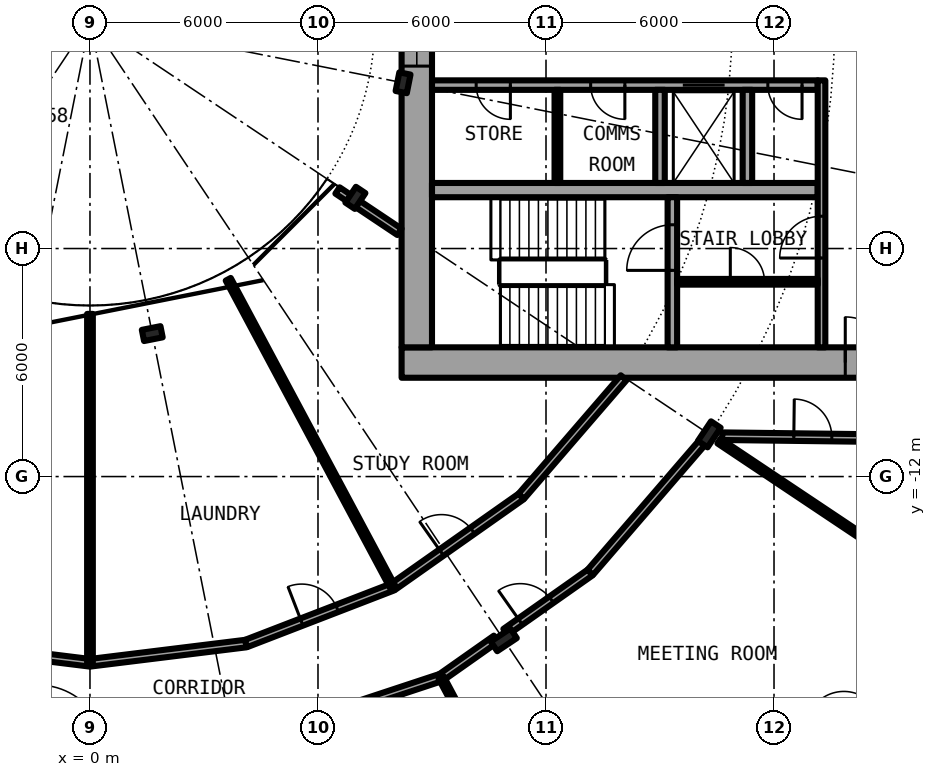
"""IFC4 building model, lengths in metres.
Left out: names, types, materials, properties, quantities, classifications, styles, units other than length and angle.
Written with IfcOpenShell. Run it as: python <this file> out.ifc"""

import sys

from ifc_helpers import new_model, si_unit, direction, frame, frame_2d, origin, origin_2d, place, context, subcontext, project, spatial, rectangle, i_section, extrude, element, fill, save


model = new_model("IFC4")
c1 = context("Model", 3, precision=1e-05, world=origin(), true_north=direction((0.0, 1.0)))
c2 = subcontext(c1, "Body", "Model", "MODEL_VIEW")
j1 = project(units=[si_unit("LENGTHUNIT", "METRE"), si_unit("PLANEANGLEUNIT", "RADIAN")], contexts=[c1])
p1 = place(None, origin())
s1 = spatial("IfcSite", under=j1, at=p1, CompositionType="ELEMENT")
p2 = place(p1, origin())
s2 = spatial("IfcBuilding", under=s1, at=p2, CompositionType="ELEMENT")
p3 = place(p2, frame((0.0, 0.0, 53.3)))
s3 = spatial("IfcBuildingStorey", under=s2, at=p3, CompositionType="ELEMENT", Elevation=53.3)
for number, where, z_axis, x_axis in (
    (1, (10.889, -16.297, 0.0), (0.0, 0.0, 1.0), (0.556, -0.831, 0.0)),
    (2, (16.297, -10.889, 0.0), (0.0, 0.0, 1.0), (0.831, -0.556, 0.0)),
):
    element("IfcColumn", number, at=place(p3, frame(where, z_axis=z_axis, x_axis=x_axis)), inside=s3, PredefinedType="COLUMN", context=c2, shape_type="SweptSolid", body=[
        extrude(i_section(OverallWidth=0.305, OverallDepth=0.62, WebThickness=0.021, FlangeThickness=0.04, FilletRadius=0.027, at=origin_2d()), origin(), (0.0, 0.0, 1.0), 4.2),
    ])
for number, where, z_axis, x_axis in (
    (3, (1.639, -8.239, 0.0), (0.0, 0.0, 1.0), (0.195, -0.981, 0.0)),
    (4, (6.984, -4.667, 0.0), (0.0, 0.0, 1.0), (0.831, -0.556, 0.0)),
    (5, (8.239, -1.639, 0.0), (0.0, 0.0, 1.0), (0.981, -0.195, 0.0)),
):
    element("IfcColumn", number, at=place(p3, frame(where, z_axis=z_axis, x_axis=x_axis)), inside=s3, PredefinedType="COLUMN", context=c2, shape_type="SweptSolid", body=[
        extrude(i_section(OverallWidth=0.3, OverallDepth=0.5, WebThickness=0.014, FlangeThickness=0.028, FilletRadius=0.027, at=origin_2d()), origin(), (0.0, 0.0, 1.0), 4.2),
    ])
p4 = place(p3, frame((19.304, -19.304, 0.0), z_axis=(0.0, 0.0, 1.0), x_axis=(0.634382322723, 0.773019449054, 0.0)))
e6 = element("IfcWall", 6, at=p4, inside=s3, PredefinedType="SOLIDWALL", context=c2, shape_type="SweptSolid", body=[
    extrude(rectangle(XDim=5.352, YDim=0.25, at=frame_2d((2.676, 0.0))), origin(), (0.0, 0.0, 1.0), 3.8),
])
p5 = place(p4, frame((0.841, 0.0, 0.0)))
e7 = element("IfcOpeningElement", 7, at=p5, cuts=e6, PredefinedType="OPENING", context=c2, shape_type="SweptSolid", body=[
    extrude(rectangle(XDim=1.0, YDim=2.2, at=frame_2d((0.5, 1.1))), frame((0.0, 0.135, 0.0), z_axis=(0.0, -1.0, 0.0), x_axis=(1.0, 0.0, 0.0)), (0.0, 0.0, 1.0), 0.27),
])
p6 = place(p4, frame((3.51, 0.0, 0.0)))
e8 = element("IfcOpeningElement", 8, at=p6, cuts=e6, PredefinedType="OPENING", context=c2, shape_type="SweptSolid", body=[
    extrude(rectangle(XDim=1.0, YDim=2.2, at=frame_2d((0.5, 1.1))), frame((0.0, 0.135, 0.0), z_axis=(0.0, -1.0, 0.0), x_axis=(1.0, 0.0, 0.0)), (0.0, 0.0, 1.0), 0.27),
])
p7 = place(p3, frame((8.2, -9.0, 0.0), z_axis=(0.0, 0.0, 1.0), x_axis=(1.0, 0.0, 0.0)))
e9 = element("IfcWall", 9, at=p7, inside=s3, PredefinedType="SHEAR", context=c2, shape_type="SweptSolid", body=[
    extrude(rectangle(XDim=14.2, YDim=0.8, at=frame_2d((7.1, 0.0))), origin(), (0.0, 0.0, 1.0), 4.2),
])
p8 = place(p7, frame((11.675, 0.0, 0.0)))
e10 = element("IfcOpeningElement", 10, at=p8, cuts=e9, PredefinedType="OPENING", context=c2, shape_type="SweptSolid", body=[
    extrude(rectangle(XDim=1.2, YDim=2.3, at=frame_2d((0.6, 1.15))), frame((0.0, 0.41, 0.0), z_axis=(0.0, -1.0, 0.0), x_axis=(1.0, 0.0, 0.0)), (0.0, 0.0, 1.0), 0.82),
])
p9 = place(p3, frame((8.6, -8.6, 0.0), z_axis=(0.0, 0.0, 1.0), x_axis=(0.0, 1.0, 0.0)))
e11 = element("IfcWall", 11, at=p9, inside=s3, PredefinedType="SHEAR", context=c2, shape_type="SweptSolid", body=[
    extrude(rectangle(XDim=17.2, YDim=0.8, at=frame_2d((8.6, 0.0))), origin(), (0.0, 0.0, 1.0), 4.2),
])
p10 = place(p9, frame((7.4, 0.0, 0.1)))
e12 = element("IfcOpeningElement", 12, at=p10, cuts=e11, PredefinedType="OPENING", context=c2, shape_type="SweptSolid", body=[
    extrude(rectangle(XDim=2.4, YDim=2.2, at=frame_2d((1.2, 1.1))), frame((0.0, 0.41, 0.0), z_axis=(0.0, -1.0, 0.0), x_axis=(1.0, 0.0, 0.0)), (0.0, 0.0, 1.0), 0.82),
])
p11 = place(p3, frame((19.15, -1.7, 0.0), z_axis=(0.0, 0.0, 1.0), x_axis=(-1.0, 0.0, 0.0)))
e13 = element("IfcWall", 13, at=p11, inside=s3, PredefinedType="SHEAR", context=c2, shape_type="SweptSolid", body=[
    extrude(rectangle(XDim=10.15, YDim=0.25, at=frame_2d((5.075, 0.0))), origin(), (0.0, 0.0, 1.0), 4.2),
])
p12 = place(p11, frame((2.45, 0.0, 0.0)))
e14 = element("IfcOpeningElement", 14, at=p12, cuts=e13, PredefinedType="OPENING", context=c2, shape_type="SweptSolid", body=[
    extrude(rectangle(XDim=1.1, YDim=2.3, at=frame_2d((0.55, 1.15))), frame((0.0, 0.135, 0.0), z_axis=(0.0, -1.0, 0.0), x_axis=(1.0, 0.0, 0.0)), (0.0, 0.0, 1.0), 0.27),
])
p13 = place(p11, frame((8.087, 0.0, 0.0)))
e15 = element("IfcOpeningElement", 15, at=p13, cuts=e13, PredefinedType="OPENING", context=c2, shape_type="SweptSolid", body=[
    extrude(rectangle(XDim=0.9, YDim=2.3, at=frame_2d((0.45, 1.15))), frame((0.0, 0.135, 0.0), z_axis=(0.0, -1.0, 0.0), x_axis=(1.0, 0.0, 0.0)), (0.0, 0.0, 1.0), 0.27),
])
p14 = place(p11, frame((5.075, 0.0, 0.0)))
e16 = element("IfcOpeningElement", 16, at=p14, cuts=e13, PredefinedType="OPENING", context=c2, shape_type="SweptSolid", body=[
    extrude(rectangle(XDim=0.9, YDim=2.3, at=frame_2d((0.45, 1.15))), frame((0.0, 0.135, 0.0), z_axis=(0.0, -1.0, 0.0), x_axis=(1.0, 0.0, 0.0)), (0.0, 0.0, 1.0), 0.27),
])
p15 = place(p11, frame((0.413, 0.0, 0.0)))
e17 = element("IfcOpeningElement", 17, at=p15, cuts=e13, PredefinedType="OPENING", context=c2, shape_type="SweptSolid", body=[
    extrude(rectangle(XDim=0.9, YDim=2.3, at=frame_2d((0.45, 1.15))), frame((0.0, 0.135, 0.0), z_axis=(0.0, -1.0, 0.0), x_axis=(1.0, 0.0, 0.0)), (0.0, 0.0, 1.0), 0.27),
])
p16 = place(p3, frame((9.0, -4.462, 0.0), z_axis=(0.0, 0.0, 1.0), x_axis=(1.0, 0.0, 0.0)))
e18 = element("IfcWall", 18, at=p16, inside=s3, PredefinedType="SHEAR", context=c2, shape_type="SweptSolid", body=[
    extrude(rectangle(XDim=10.15, YDim=0.375, at=frame_2d((5.075, 0.0))), origin(), (0.0, 0.0, 1.0), 4.2),
])
p17 = place(p3, frame((15.325, -8.6, 0.0), z_axis=(0.0, 0.0, 1.0), x_axis=(0.0, 1.0, 0.0)))
e19 = element("IfcWall", 19, at=p17, inside=s3, PredefinedType="SHEAR", context=c2, shape_type="SweptSolid", body=[
    extrude(rectangle(XDim=3.95, YDim=0.25, at=frame_2d((1.975, 0.0))), origin(), (0.0, 0.0, 1.0), 4.2),
])
p18 = place(p17, frame((2.025, 0.0, 0.0)))
e20 = element("IfcOpeningElement", 20, at=p18, cuts=e19, PredefinedType="OPENING", context=c2, shape_type="SweptSolid", body=[
    extrude(rectangle(XDim=1.2, YDim=2.3, at=frame_2d((0.6, 1.15))), frame((0.0, 0.135, 0.0), z_axis=(0.0, -1.0, 0.0), x_axis=(1.0, 0.0, 0.0)), (0.0, 0.0, 1.0), 0.27),
])
for number, where, z_axis, x_axis in (
    (21, (15.0, -1.825, 0.0), (0.0, 0.0, 1.0), (0.0, -1.0, 0.0)),
    (22, (17.3, -1.825, 0.0), (0.0, 0.0, 1.0), (0.0, -1.0, 0.0)),
):
    element("IfcWall", number, at=place(p3, frame(where, z_axis=z_axis, x_axis=x_axis)), inside=s3, PredefinedType="SOLIDWALL", context=c2, shape_type="SweptSolid", body=[
        extrude(rectangle(XDim=2.45, YDim=0.25, at=frame_2d((1.225, 0.0))), origin(), (0.0, 0.0, 1.0), 3.8),
    ])
p19 = place(p3, frame((19.25, -8.6, 0.0), z_axis=(0.0, 0.0, 1.0), x_axis=(0.0, 1.0, 0.0)))
e23 = element("IfcWall", 23, at=p19, inside=s3, PredefinedType="SOLIDWALL", context=c2, shape_type="SweptSolid", body=[
    extrude(rectangle(XDim=7.025, YDim=0.2, at=frame_2d((3.513, 0.0))), origin(), (0.0, 0.0, 1.0), 3.8),
])
p20 = place(p19, frame((2.35, 0.0, 0.0)))
e24 = element("IfcOpeningElement", 24, at=p20, cuts=e23, PredefinedType="OPENING", context=c2, shape_type="SweptSolid", body=[
    extrude(rectangle(XDim=1.1, YDim=2.3, at=frame_2d((0.55, 1.15))), frame((0.0, 0.11, 0.0), z_axis=(0.0, -1.0, 0.0), x_axis=(1.0, 0.0, 0.0)), (0.0, 0.0, 1.0), 0.22),
])
p21 = place(p3, frame((12.3, -1.825, 0.0), z_axis=(0.0, 0.0, 1.0), x_axis=(0.0, -1.0, 0.0)))
e25 = element("IfcWall", 25, at=p21, inside=s3, PredefinedType="PARTITIONING", context=c2, shape_type="SweptSolid", body=[
    extrude(rectangle(XDim=2.45, YDim=0.15, at=frame_2d((1.225, 0.0))), origin(), (0.0, 0.0, 1.0), 3.8),
])
p22 = place(p3, frame((15.45, -6.875, 0.0), z_axis=(0.0, 0.0, 1.0), x_axis=(1.0, 0.0, 0.0)))
e26 = element("IfcWall", 26, at=p22, inside=s3, PredefinedType="PARTITIONING", context=c2, shape_type="SweptSolid", body=[
    extrude(rectangle(XDim=3.7, YDim=0.15, at=frame_2d((1.85, 0.0))), origin(), (0.0, 0.0, 1.0), 3.8),
])
p23 = place(p22, frame((1.4, 0.0, 0.0)))
e27 = element("IfcOpeningElement", 27, at=p23, cuts=e26, PredefinedType="OPENING", context=c2, shape_type="SweptSolid", body=[
    extrude(rectangle(XDim=0.9, YDim=2.3, at=frame_2d((0.45, 1.15))), frame((0.0, 0.085, 0.0), z_axis=(0.0, -1.0, 0.0), x_axis=(1.0, 0.0, 0.0)), (0.0, 0.0, 1.0), 0.17),
])
p24 = place(p3, frame((9.239, -17.286, 0.0), z_axis=(0.0, 0.0, 1.0), x_axis=(0.81766692021, 0.575691590693, 0.0)))
e28 = element("IfcWall", 28, at=p24, inside=s3, PredefinedType="PARTITIONING", context=c2, shape_type="SweptSolid", body=[
    extrude(rectangle(XDim=1.77, YDim=0.2, at=frame_2d((0.885, 0.0))), origin(), (0.0, 0.0, 1.0), 3.48),
])
p25 = place(p3, frame((10.935, -16.091, 0.0), z_axis=(0.0, 0.0, 1.0), x_axis=(0.817764243714, 0.575553335237, 0.0)))
e29 = element("IfcWall", 29, at=p25, inside=s3, PredefinedType="PARTITIONING", context=c2, shape_type="SweptSolid", body=[
    extrude(rectangle(XDim=2.725, YDim=0.2, at=frame_2d((1.362, 0.0))), origin(), (0.0, 0.0, 1.0), 3.48),
])
p26 = place(p25, frame((0.475, 0.0, 0.0)))
e30 = element("IfcOpeningElement", 30, at=p26, cuts=e29, PredefinedType="OPENING", context=c2, shape_type="SweptSolid", body=[
    extrude(rectangle(XDim=1.0, YDim=2.3, at=frame_2d((0.5, 1.15))), frame((0.0, 0.11, 0.0), z_axis=(0.0, -1.0, 0.0), x_axis=(1.0, 0.0, 0.0)), (0.0, 0.0, 1.0), 0.22),
])
p27 = place(p3, frame((13.163, -14.523, 0.0), z_axis=(0.0, 0.0, 1.0), x_axis=(0.653087281304, 0.757282644063, 0.0)))
e31 = element("IfcWall", 31, at=p27, inside=s3, PredefinedType="PARTITIONING", context=c2, shape_type="SweptSolid", body=[
    extrude(rectangle(XDim=4.644, YDim=0.2, at=frame_2d((2.322, 0.0))), origin(), (0.0, 0.0, 1.0), 3.48),
])
p28 = place(p3, frame((3.942, -19.036, 0.0), z_axis=(0.0, 0.0, 1.0), x_axis=(0.949524538902, 0.313692763739, 0.0)))
e32 = element("IfcWall", 32, at=p28, inside=s3, PredefinedType="PARTITIONING", context=c2, shape_type="SweptSolid", body=[
    extrude(rectangle(XDim=5.579, YDim=0.2, at=frame_2d((2.789, 0.0))), origin(), (0.0, 0.0, 1.0), 3.48),
])
for number, where, z_axis, x_axis in (
    (33, (-4.106, -16.394, 0.0), (0.0, 0.0, 1.0), (0.992, -0.122, 0.0)),
    (34, (0.0, -16.9, 0.0), (0.0, 0.0, 1.0), (0.992, 0.122, 0.0)),
):
    element("IfcWall", number, at=place(p3, frame(where, z_axis=z_axis, x_axis=x_axis)), inside=s3, PredefinedType="PARTITIONING", context=c2, shape_type="SweptSolid", body=[
        extrude(rectangle(XDim=4.137, YDim=0.2, at=frame_2d((2.068, 0.0))), origin(), (0.0, 0.0, 1.0), 3.8),
    ])
p29 = place(p3, frame((4.106, -16.394, 0.0), z_axis=(0.0, 0.0, 1.0), x_axis=(0.932943640288, 0.360022449363, 0.0)))
e35 = element("IfcWall", 35, at=p29, inside=s3, PredefinedType="PARTITIONING", context=c2, shape_type="SweptSolid", body=[
    extrude(rectangle(XDim=4.139, YDim=0.2, at=frame_2d((2.069, 0.0))), origin(), (0.0, 0.0, 1.0), 3.8),
])
p30 = place(p29, frame((1.569, 0.0, 0.0)))
e36 = element("IfcOpeningElement", 36, at=p30, cuts=e35, PredefinedType="OPENING", context=c2, shape_type="SweptSolid", body=[
    extrude(rectangle(XDim=1.0, YDim=2.3, at=frame_2d((0.5, 1.15))), frame((0.0, 0.11, 0.0), z_axis=(0.0, -1.0, 0.0), x_axis=(1.0, 0.0, 0.0)), (0.0, 0.0, 1.0), 0.22),
])
p31 = place(p3, frame((7.967, -14.904, 0.0), z_axis=(0.0, 0.0, 1.0), x_axis=(0.817567680547, 0.575832517079, 0.0)))
e37 = element("IfcWall", 37, at=p31, inside=s3, PredefinedType="PARTITIONING", context=c2, shape_type="SweptSolid", body=[
    extrude(rectangle(XDim=4.137, YDim=0.2, at=frame_2d((2.068, 0.0))), origin(), (0.0, 0.0, 1.0), 3.8),
])
p32 = place(p31, frame((1.568, 0.0, 0.0)))
e38 = element("IfcOpeningElement", 38, at=p32, cuts=e37, PredefinedType="OPENING", context=c2, shape_type="SweptSolid", body=[
    extrude(rectangle(XDim=1.0, YDim=2.3, at=frame_2d((0.5, 1.15))), frame((0.0, 0.11, 0.0), z_axis=(0.0, -1.0, 0.0), x_axis=(1.0, 0.0, 0.0)), (0.0, 0.0, 1.0), 0.22),
])
p33 = place(p3, frame((11.349, -12.522, 0.0), z_axis=(0.0, 0.0, 1.0), x_axis=(0.653274518104, 0.757121129012, 0.0)))
e39 = element("IfcWall", 39, at=p33, inside=s3, PredefinedType="PARTITIONING", context=c2, shape_type="SweptSolid", body=[
    extrude(rectangle(XDim=4.124, YDim=0.2, at=frame_2d((2.062, 0.0))), origin(), (0.0, 0.0, 1.0), 3.8),
])
p34 = place(p3, frame((16.637, -10.938, 0.0), z_axis=(0.0, 0.0, 1.0), x_axis=(0.99992425795, -0.012307654658, 0.0)))
e40 = element("IfcWall", 40, at=p34, inside=s3, PredefinedType="PARTITIONING", context=c2, shape_type="SweptSolid", body=[
    extrude(rectangle(XDim=5.039, YDim=0.2, at=frame_2d((2.519, 0.0))), origin(), (0.0, 0.0, 1.0), 3.8),
])
p35 = place(p34, frame((1.884, 0.0, 0.0)))
e41 = element("IfcOpeningElement", 41, at=p35, cuts=e40, PredefinedType="OPENING", context=c2, shape_type="SweptSolid", body=[
    extrude(rectangle(XDim=1.0, YDim=2.3, at=frame_2d((0.5, 1.15))), frame((0.0, 0.11, 0.0), z_axis=(0.0, -1.0, 0.0), x_axis=(1.0, 0.0, 0.0)), (0.0, 0.0, 1.0), 0.22),
])
p36 = place(p3, frame((6.513, -4.472, 0.0), z_axis=(0.0, 0.0, 1.0), x_axis=(0.831417956244, -0.555647533996, 0.0)))
e42 = element("IfcWall", 42, at=p36, inside=s3, PredefinedType="PARTITIONING", context=c2, shape_type="SweptSolid", body=[
    extrude(rectangle(XDim=1.962, YDim=0.2, at=frame_2d((0.981, 0.0))), origin(), (0.0, 0.0, 1.0), 3.8),
])
p37 = place(p3, frame((0.0, -16.9, 0.0), z_axis=(0.0, 0.0, 1.0), x_axis=(0.0, 1.0, 0.0)))
e43 = element("IfcWall", 43, at=p37, inside=s3, PredefinedType="PARTITIONING", context=c2, shape_type="SweptSolid", body=[
    extrude(rectangle(XDim=9.18, YDim=0.15, at=frame_2d((4.59, 0.0))), origin(), (0.0, 0.0, 1.0), 3.8),
])
p38 = place(p3, frame((3.638, -6.809, 0.0), z_axis=(0.0, 0.0, 1.0), x_axis=(0.471460365694, -0.881887251059, 0.0)))
e44 = element("IfcWall", 44, at=p38, inside=s3, PredefinedType="PARTITIONING", context=c2, shape_type="SweptSolid", body=[
    extrude(rectangle(XDim=9.18, YDim=0.15, at=frame_2d((4.59, 0.0))), origin(), (0.0, 0.0, 1.0), 3.8),
])
p39 = place(p3, frame((9.239, -17.286, 0.0), z_axis=(0.0, 0.0, 1.0), x_axis=(0.471439510802, -0.881898399848, 0.0)))
e45 = element("IfcWall", 45, at=p39, inside=s3, PredefinedType="PARTITIONING", context=c2, shape_type="SweptSolid", body=[
    extrude(rectangle(XDim=7.575, YDim=0.15, at=frame_2d((3.787, 0.0))), origin(), (0.0, 0.0, 1.0), 3.8),
])
p40 = place(p3, frame((16.552, -11.065, 0.0), z_axis=(0.0, 0.0, 1.0), x_axis=(0.831491533374, -0.555537424416, 0.0)))
e46 = element("IfcWall", 46, at=p40, inside=s3, PredefinedType="PARTITIONING", context=c2, shape_type="SweptSolid", body=[
    extrude(rectangle(XDim=7.265, YDim=0.15, at=frame_2d((3.633, 0.0))), origin(), (0.0, 0.0, 1.0), 3.8),
])
p41 = place(p12, origin())
e47 = element("IfcDoor", 47, at=p41, inside=s3, OperationType="DOUBLE_DOOR_SLIDING", PredefinedType="DOOR", context=c2, shape_type="SweptSolid", body=[
    extrude(rectangle(XDim=1.1, YDim=2.3, at=frame_2d((0.55, 1.15))), frame((0.0, 0.025, 0.0), z_axis=(0.0, -1.0, 0.0), x_axis=(1.0, 0.0, 0.0)), (0.0, 0.0, 1.0), 0.05),
])
fill(e14, e47)
p42 = place(p13, origin())
e48 = element("IfcDoor", 48, at=p42, inside=s3, OperationType="SINGLE_SWING_LEFT", PredefinedType="DOOR", context=c2, shape_type="SweptSolid", body=[
    extrude(rectangle(XDim=0.9, YDim=2.3, at=frame_2d((0.45, 1.15))), frame((0.0, 0.025, 0.0), z_axis=(0.0, -1.0, 0.0), x_axis=(1.0, 0.0, 0.0)), (0.0, 0.0, 1.0), 0.05),
])
fill(e15, e48)
p43 = place(p14, origin())
e49 = element("IfcDoor", 49, at=p43, inside=s3, OperationType="SINGLE_SWING_LEFT", PredefinedType="DOOR", context=c2, shape_type="SweptSolid", body=[
    extrude(rectangle(XDim=0.9, YDim=2.3, at=frame_2d((0.45, 1.15))), frame((0.0, 0.025, 0.0), z_axis=(0.0, -1.0, 0.0), x_axis=(1.0, 0.0, 0.0)), (0.0, 0.0, 1.0), 0.05),
])
fill(e16, e49)
p44 = place(p15, origin())
e50 = element("IfcDoor", 50, at=p44, inside=s3, OperationType="SINGLE_SWING_RIGHT", PredefinedType="DOOR", context=c2, shape_type="SweptSolid", body=[
    extrude(rectangle(XDim=0.9, YDim=2.3, at=frame_2d((0.45, 1.15))), frame((0.0, 0.025, 0.0), z_axis=(0.0, -1.0, 0.0), x_axis=(1.0, 0.0, 0.0)), (0.0, 0.0, 1.0), 0.05),
])
fill(e17, e50)
p45 = place(p23, origin())
e51 = element("IfcDoor", 51, at=p45, inside=s3, OperationType="SINGLE_SWING_LEFT", PredefinedType="DOOR", context=c2, shape_type="SweptSolid", body=[
    extrude(rectangle(XDim=0.9, YDim=2.3, at=frame_2d((0.45, 1.15))), frame((0.0, 0.025, 0.0), z_axis=(0.0, -1.0, 0.0), x_axis=(1.0, 0.0, 0.0)), (0.0, 0.0, 1.0), 0.05),
])
fill(e27, e51)
p46 = place(p18, origin())
e52 = element("IfcDoor", 52, at=p46, inside=s3, OperationType="SINGLE_SWING_LEFT", PredefinedType="DOOR", context=c2, shape_type="SweptSolid", body=[
    extrude(rectangle(XDim=1.2, YDim=2.3, at=frame_2d((0.6, 1.15))), frame((0.0, 0.025, 0.0), z_axis=(0.0, -1.0, 0.0), x_axis=(1.0, 0.0, 0.0)), (0.0, 0.0, 1.0), 0.05),
])
fill(e20, e52)
p47 = place(p20, origin())
e53 = element("IfcDoor", 53, at=p47, inside=s3, OperationType="SINGLE_SWING_RIGHT", PredefinedType="DOOR", context=c2, shape_type="SweptSolid", body=[
    extrude(rectangle(XDim=1.1, YDim=2.3, at=frame_2d((0.55, 1.15))), frame((0.0, 0.025, 0.0), z_axis=(0.0, -1.0, 0.0), x_axis=(1.0, 0.0, 0.0)), (0.0, 0.0, 1.0), 0.05),
])
fill(e24, e53)
p48 = place(p8, origin())
e54 = element("IfcDoor", 54, at=p48, inside=s3, OperationType="SINGLE_SWING_LEFT", PredefinedType="DOOR", context=c2, shape_type="SweptSolid", body=[
    extrude(rectangle(XDim=1.2, YDim=2.3, at=frame_2d((0.6, 1.15))), frame((0.0, 0.025, 0.0), z_axis=(0.0, -1.0, 0.0), x_axis=(1.0, 0.0, 0.0)), (0.0, 0.0, 1.0), 0.05),
])
fill(e10, e54)
p49 = place(p10, origin())
e55 = element("IfcWindow", 55, at=p49, inside=s3, PartitioningType="SINGLE_PANEL", PredefinedType="WINDOW", context=c2, shape_type="SweptSolid", body=[
    extrude(rectangle(XDim=2.4, YDim=2.2, at=frame_2d((1.2, 1.1))), frame((0.0, 0.03, 0.0), z_axis=(0.0, -1.0, 0.0), x_axis=(1.0, 0.0, 0.0)), (0.0, 0.0, 1.0), 0.06),
])
fill(e12, e55)
p50 = place(p26, origin())
e56 = element("IfcDoor", 56, at=p50, inside=s3, OperationType="SINGLE_SWING_LEFT", PredefinedType="DOOR", context=c2, shape_type="SweptSolid", body=[
    extrude(rectangle(XDim=1.0, YDim=2.3, at=frame_2d((0.5, 1.15))), frame((0.0, 0.025, 0.0), z_axis=(0.0, -1.0, 0.0), x_axis=(1.0, 0.0, 0.0)), (0.0, 0.0, 1.0), 0.05),
])
fill(e30, e56)
p51 = place(p30, origin())
e57 = element("IfcDoor", 57, at=p51, inside=s3, OperationType="SINGLE_SWING_RIGHT", PredefinedType="DOOR", context=c2, shape_type="SweptSolid", body=[
    extrude(rectangle(XDim=1.0, YDim=2.3, at=frame_2d((0.5, 1.15))), frame((0.0, 0.025, 0.0), z_axis=(0.0, -1.0, 0.0), x_axis=(1.0, 0.0, 0.0)), (0.0, 0.0, 1.0), 0.05),
])
fill(e36, e57)
p52 = place(p32, origin())
e58 = element("IfcDoor", 58, at=p52, inside=s3, OperationType="SINGLE_SWING_RIGHT", PredefinedType="DOOR", context=c2, shape_type="SweptSolid", body=[
    extrude(rectangle(XDim=1.0, YDim=2.3, at=frame_2d((0.5, 1.15))), frame((0.0, 0.025, 0.0), z_axis=(0.0, -1.0, 0.0), x_axis=(1.0, 0.0, 0.0)), (0.0, 0.0, 1.0), 0.05),
])
fill(e38, e58)
p53 = place(p35, origin())
e59 = element("IfcDoor", 59, at=p53, inside=s3, OperationType="SINGLE_SWING_LEFT", PredefinedType="DOOR", context=c2, shape_type="SweptSolid", body=[
    extrude(rectangle(XDim=1.0, YDim=2.3, at=frame_2d((0.5, 1.15))), frame((0.0, 0.025, 0.0), z_axis=(0.0, -1.0, 0.0), x_axis=(1.0, 0.0, 0.0)), (0.0, 0.0, 1.0), 0.05),
])
fill(e41, e59)
save(model, sys.argv[1])
